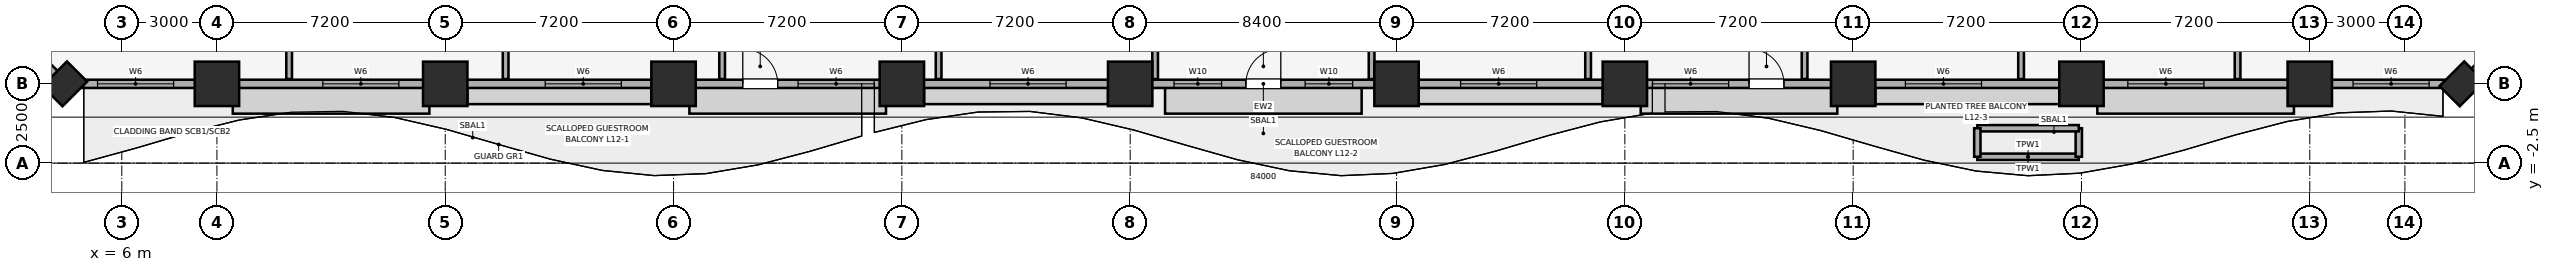
"""IFC4 building model, lengths in metres.
Left out: names, types, materials, properties, quantities, classifications, styles, units other than length and angle.
Written with IfcOpenShell. Run it as: python <this file> out.ifc"""

import sys

from ifc_helpers import new_model, si_unit, direction, frame, frame_2d, origin, origin_2d, place, context, subcontext, project, spatial, rectangle, extrude, element, fill, save


model = new_model("IFC4")
c1 = context("Model", 3, precision=1e-05, world=origin(), true_north=direction((0.0, 1.0)))
c2 = subcontext(c1, "Body", "Model", "MODEL_VIEW")
j1 = project(units=[si_unit("LENGTHUNIT", "METRE"), si_unit("PLANEANGLEUNIT", "RADIAN")], contexts=[c1])
p1 = place(None, origin())
s1 = spatial("IfcSite", under=j1, at=p1, CompositionType="ELEMENT")
p2 = place(p1, origin())
s2 = spatial("IfcBuilding", under=s1, at=p2, CompositionType="ELEMENT")
p3 = place(p2, frame((0.0, 0.0, 57.65)))
s3 = spatial("IfcBuildingStorey", under=s2, at=p3, CompositionType="ELEMENT", Elevation=57.65)
for number, where, z_axis, x_axis in (
    (1, (9.0, 0.0, 0.0), (0.0, 0.0, 1.0), (1.0, 0.0, 0.0)),
    (2, (16.2, 0.0, 0.0), (0.0, 0.0, 1.0), (1.0, 0.0, 0.0)),
    (3, (23.4, 0.0, 0.0), (0.0, 0.0, 1.0), (1.0, 0.0, 0.0)),
    (4, (30.6, 0.0, 0.0), (0.0, 0.0, 1.0), (1.0, 0.0, 0.0)),
    (5, (37.8, 0.0, 0.0), (0.0, 0.0, 1.0), (1.0, 0.0, 0.0)),
    (6, (46.2, 0.0, 0.0), (0.0, 0.0, 1.0), (1.0, 0.0, 0.0)),
    (7, (53.4, 0.0, 0.0), (0.0, 0.0, 1.0), (1.0, 0.0, 0.0)),
    (8, (60.6, 0.0, 0.0), (0.0, 0.0, 1.0), (1.0, 0.0, 0.0)),
    (9, (67.8, 0.0, 0.0), (0.0, 0.0, 1.0), (1.0, 0.0, 0.0)),
    (10, (75.0, 0.0, 0.0), (0.0, 0.0, 1.0), (1.0, 0.0, 0.0)),
):
    element("IfcColumn", number, at=place(p3, frame(where, z_axis=z_axis, x_axis=x_axis)), inside=s3, PredefinedType="COLUMN", context=c2, shape_type="SweptSolid", body=[
        extrude(rectangle(XDim=1.4, YDim=1.4, at=origin_2d()), origin(), (0.0, 0.0, 1.0), 3.51),
    ])
for number, where, z_axis, x_axis in (
    (11, (4.2, 0.0, 0.0), (0.0, 0.0, 1.0), (0.707, 0.707, 0.0)),
    (12, (79.8, 0.0, 0.0), (0.0, 0.0, 1.0), (0.707, 0.707, 0.0)),
):
    element("IfcColumn", number, at=place(p3, frame(where, z_axis=z_axis, x_axis=x_axis)), inside=s3, PredefinedType="PILASTER", context=c2, shape_type="SweptSolid", body=[
        extrude(rectangle(XDim=1.1, YDim=0.9, at=origin_2d()), origin(), (0.0, 0.0, 1.0), 3.51),
    ])
p4 = place(p3, frame((4.2, 0.0, 0.0), z_axis=(0.0, 0.0, 1.0), x_axis=(1.0, 0.0, 0.0)))
e13 = element("IfcWall", 13, at=p4, inside=s3, PredefinedType="SOLIDWALL", context=c2, shape_type="SweptSolid", body=[
    extrude(rectangle(XDim=75.6, YDim=0.26, at=frame_2d((37.8, 0.0))), origin(), (0.0, 0.0, 1.0), 2.56),
])
p5 = place(p4, frame((21.383, 0.0, 0.0)))
e14 = element("IfcOpeningElement", 14, at=p5, cuts=e13, PredefinedType="OPENING", context=c2, shape_type="SweptSolid", body=[
    extrude(rectangle(XDim=1.1, YDim=2.15, at=frame_2d((0.55, 1.075))), frame((0.0, 0.14, 0.0), z_axis=(0.0, -1.0, 0.0), x_axis=(1.0, 0.0, 0.0)), (0.0, 0.0, 1.0), 0.28),
])
p6 = place(p4, frame((37.25, 0.0, 0.0)))
e15 = element("IfcOpeningElement", 15, at=p6, cuts=e13, PredefinedType="OPENING", context=c2, shape_type="SweptSolid", body=[
    extrude(rectangle(XDim=1.1, YDim=2.15, at=frame_2d((0.55, 1.075))), frame((0.0, 0.14, 0.0), z_axis=(0.0, -1.0, 0.0), x_axis=(1.0, 0.0, 0.0)), (0.0, 0.0, 1.0), 0.28),
])
p7 = place(p4, frame((53.117, 0.0, 0.0)))
e16 = element("IfcOpeningElement", 16, at=p7, cuts=e13, PredefinedType="OPENING", context=c2, shape_type="SweptSolid", body=[
    extrude(rectangle(XDim=1.1, YDim=2.15, at=frame_2d((0.55, 1.075))), frame((0.0, 0.14, 0.0), z_axis=(0.0, -1.0, 0.0), x_axis=(1.0, 0.0, 0.0)), (0.0, 0.0, 1.0), 0.28),
])
p8 = place(p4, frame((1.035, 0.0, 0.85)))
e17 = element("IfcOpeningElement", 17, at=p8, cuts=e13, PredefinedType="OPENING", context=c2, shape_type="SweptSolid", body=[
    extrude(rectangle(XDim=2.4, YDim=1.5, at=frame_2d((1.2, 0.75))), frame((0.0, 0.14, 0.0), z_axis=(0.0, -1.0, 0.0), x_axis=(1.0, 0.0, 0.0)), (0.0, 0.0, 1.0), 0.28),
])
p9 = place(p4, frame((8.138, 0.0, 0.85)))
e18 = element("IfcOpeningElement", 18, at=p9, cuts=e13, PredefinedType="OPENING", context=c2, shape_type="SweptSolid", body=[
    extrude(rectangle(XDim=2.4, YDim=1.5, at=frame_2d((1.2, 0.75))), frame((0.0, 0.14, 0.0), z_axis=(0.0, -1.0, 0.0), x_axis=(1.0, 0.0, 0.0)), (0.0, 0.0, 1.0), 0.28),
])
p10 = place(p4, frame((15.153, 0.0, 0.85)))
e19 = element("IfcOpeningElement", 19, at=p10, cuts=e13, PredefinedType="OPENING", context=c2, shape_type="SweptSolid", body=[
    extrude(rectangle(XDim=2.4, YDim=1.5, at=frame_2d((1.2, 0.75))), frame((0.0, 0.14, 0.0), z_axis=(0.0, -1.0, 0.0), x_axis=(1.0, 0.0, 0.0)), (0.0, 0.0, 1.0), 0.28),
])
p11 = place(p4, frame((23.127, 0.0, 0.85)))
e20 = element("IfcOpeningElement", 20, at=p11, cuts=e13, PredefinedType="OPENING", context=c2, shape_type="SweptSolid", body=[
    extrude(rectangle(XDim=2.4, YDim=1.5, at=frame_2d((1.2, 0.75))), frame((0.0, 0.14, 0.0), z_axis=(0.0, -1.0, 0.0), x_axis=(1.0, 0.0, 0.0)), (0.0, 0.0, 1.0), 0.28),
])
p12 = place(p4, frame((29.179, 0.0, 0.85)))
e21 = element("IfcOpeningElement", 21, at=p12, cuts=e13, PredefinedType="OPENING", context=c2, shape_type="SweptSolid", body=[
    extrude(rectangle(XDim=2.4, YDim=1.5, at=frame_2d((1.2, 0.75))), frame((0.0, 0.14, 0.0), z_axis=(0.0, -1.0, 0.0), x_axis=(1.0, 0.0, 0.0)), (0.0, 0.0, 1.0), 0.28),
])
p13 = place(p4, frame((34.983, 0.0, 0.85)))
e22 = element("IfcOpeningElement", 22, at=p13, cuts=e13, PredefinedType="OPENING", context=c2, shape_type="SweptSolid", body=[
    extrude(rectangle(XDim=1.5, YDim=1.4, at=frame_2d((0.75, 0.7))), frame((0.0, 0.14, 0.0), z_axis=(0.0, -1.0, 0.0), x_axis=(1.0, 0.0, 0.0)), (0.0, 0.0, 1.0), 0.28),
])
p14 = place(p4, frame((39.117, 0.0, 0.85)))
e23 = element("IfcOpeningElement", 23, at=p14, cuts=e13, PredefinedType="OPENING", context=c2, shape_type="SweptSolid", body=[
    extrude(rectangle(XDim=1.5, YDim=1.4, at=frame_2d((0.75, 0.7))), frame((0.0, 0.14, 0.0), z_axis=(0.0, -1.0, 0.0), x_axis=(1.0, 0.0, 0.0)), (0.0, 0.0, 1.0), 0.28),
])
p15 = place(p4, frame((44.021, 0.0, 0.85)))
e24 = element("IfcOpeningElement", 24, at=p15, cuts=e13, PredefinedType="OPENING", context=c2, shape_type="SweptSolid", body=[
    extrude(rectangle(XDim=2.4, YDim=1.5, at=frame_2d((1.2, 0.75))), frame((0.0, 0.14, 0.0), z_axis=(0.0, -1.0, 0.0), x_axis=(1.0, 0.0, 0.0)), (0.0, 0.0, 1.0), 0.28),
])
p16 = place(p4, frame((50.073, 0.0, 0.85)))
e25 = element("IfcOpeningElement", 25, at=p16, cuts=e13, PredefinedType="OPENING", context=c2, shape_type="SweptSolid", body=[
    extrude(rectangle(XDim=2.4, YDim=1.5, at=frame_2d((1.2, 0.75))), frame((0.0, 0.14, 0.0), z_axis=(0.0, -1.0, 0.0), x_axis=(1.0, 0.0, 0.0)), (0.0, 0.0, 1.0), 0.28),
])
p17 = place(p4, frame((58.048, 0.0, 0.85)))
e26 = element("IfcOpeningElement", 26, at=p17, cuts=e13, PredefinedType="OPENING", context=c2, shape_type="SweptSolid", body=[
    extrude(rectangle(XDim=2.4, YDim=1.5, at=frame_2d((1.2, 0.75))), frame((0.0, 0.14, 0.0), z_axis=(0.0, -1.0, 0.0), x_axis=(1.0, 0.0, 0.0)), (0.0, 0.0, 1.0), 0.28),
])
p18 = place(p4, frame((65.062, 0.0, 0.85)))
e27 = element("IfcOpeningElement", 27, at=p18, cuts=e13, PredefinedType="OPENING", context=c2, shape_type="SweptSolid", body=[
    extrude(rectangle(XDim=2.4, YDim=1.5, at=frame_2d((1.2, 0.75))), frame((0.0, 0.14, 0.0), z_axis=(0.0, -1.0, 0.0), x_axis=(1.0, 0.0, 0.0)), (0.0, 0.0, 1.0), 0.28),
])
p19 = place(p4, frame((72.165, 0.0, 0.85)))
e28 = element("IfcOpeningElement", 28, at=p19, cuts=e13, PredefinedType="OPENING", context=c2, shape_type="SweptSolid", body=[
    extrude(rectangle(XDim=2.4, YDim=1.5, at=frame_2d((1.2, 0.75))), frame((0.0, 0.14, 0.0), z_axis=(0.0, -1.0, 0.0), x_axis=(1.0, 0.0, 0.0)), (0.0, 0.0, 1.0), 0.28),
])
for number, where, z_axis, x_axis in (
    (29, (79.8, 0.0, 0.0), (0.0, 0.0, 1.0), (0.707, 0.707, 0.0)),
    (30, (0.0, 4.2, 0.0), (0.0, 0.0, 1.0), (0.707, -0.707, 0.0)),
):
    element("IfcWall", number, at=place(p3, frame(where, z_axis=z_axis, x_axis=x_axis)), inside=s3, PredefinedType="SOLIDWALL", context=c2, shape_type="SweptSolid", body=[
        extrude(rectangle(XDim=5.94, YDim=0.26, at=frame_2d((2.97, 0.0))), origin(), (0.0, 0.0, 1.0), 2.56),
    ])
p20 = place(p3, frame((64.516, -2.3, 0.0), z_axis=(0.0, 0.0, 1.0), x_axis=(1.0, 0.0, 0.0)))
e31 = element("IfcWall", 31, at=p20, inside=s3, PredefinedType="PARAPET", context=c2, shape_type="SweptSolid", body=[
    extrude(rectangle(XDim=3.2, YDim=0.2, at=frame_2d((1.6, 0.0))), origin(), (0.0, 0.0, 1.0), 0.55),
])
p21 = place(p3, frame((67.716, -2.3, 0.0), z_axis=(0.0, 0.0, 1.0), x_axis=(0.0, 1.0, 0.0)))
e32 = element("IfcWall", 32, at=p21, inside=s3, PredefinedType="PARAPET", context=c2, shape_type="SweptSolid", body=[
    extrude(rectangle(XDim=0.9, YDim=0.2, at=frame_2d((0.45, 0.0))), origin(), (0.0, 0.0, 1.0), 0.55),
])
p22 = place(p3, frame((67.716, -1.4, 0.0), z_axis=(0.0, 0.0, 1.0), x_axis=(-1.0, 0.0, 0.0)))
e33 = element("IfcWall", 33, at=p22, inside=s3, PredefinedType="PARAPET", context=c2, shape_type="SweptSolid", body=[
    extrude(rectangle(XDim=3.2, YDim=0.2, at=frame_2d((1.6, 0.0))), origin(), (0.0, 0.0, 1.0), 0.55),
])
p23 = place(p3, frame((64.516, -1.4, 0.0), z_axis=(0.0, 0.0, 1.0), x_axis=(0.0, -1.0, 0.0)))
e34 = element("IfcWall", 34, at=p23, inside=s3, PredefinedType="PARAPET", context=c2, shape_type="SweptSolid", body=[
    extrude(rectangle(XDim=0.9, YDim=0.2, at=frame_2d((0.45, 0.0))), origin(), (0.0, 0.0, 1.0), 0.55),
])
for number, where, z_axis, x_axis in (
    (35, (11.277, 0.15, 0.0), (0.0, 0.0, 1.0), (0.0, 1.0, 0.0)),
    (36, (18.104, 0.15, 0.0), (0.0, 0.0, 1.0), (0.0, 1.0, 0.0)),
    (37, (24.932, 0.15, 0.0), (0.0, 0.0, 1.0), (0.0, 1.0, 0.0)),
    (38, (31.759, 0.15, 0.0), (0.0, 0.0, 1.0), (0.0, 1.0, 0.0)),
    (39, (38.586, 0.15, 0.0), (0.0, 0.0, 1.0), (0.0, 1.0, 0.0)),
    (40, (45.414, 0.15, 0.0), (0.0, 0.0, 1.0), (0.0, 1.0, 0.0)),
    (41, (52.241, 0.15, 0.0), (0.0, 0.0, 1.0), (0.0, 1.0, 0.0)),
    (42, (59.068, 0.15, 0.0), (0.0, 0.0, 1.0), (0.0, 1.0, 0.0)),
    (43, (65.896, 0.15, 0.0), (0.0, 0.0, 1.0), (0.0, 1.0, 0.0)),
    (44, (72.723, 0.15, 0.0), (0.0, 0.0, 1.0), (0.0, 1.0, 0.0)),
):
    element("IfcWall", number, at=place(p3, frame(where, z_axis=z_axis, x_axis=x_axis)), inside=s3, PredefinedType="PARTITIONING", context=c2, shape_type="SweptSolid", body=[
        extrude(rectangle(XDim=11.355, YDim=0.18, at=frame_2d((5.677, 0.0))), origin(), (0.0, 0.0, 1.0), 3.51),
    ])
p24 = place(p5, origin())
e45 = element("IfcDoor", 45, at=p24, inside=s3, OperationType="SINGLE_SWING_LEFT", PredefinedType="DOOR", context=c2, shape_type="SweptSolid", body=[
    extrude(rectangle(XDim=1.1, YDim=2.15, at=frame_2d((0.55, 1.075))), frame((0.0, 0.025, 0.0), z_axis=(0.0, -1.0, 0.0), x_axis=(1.0, 0.0, 0.0)), (0.0, 0.0, 1.0), 0.05),
])
fill(e14, e45)
p25 = place(p6, origin())
e46 = element("IfcDoor", 46, at=p25, inside=s3, OperationType="SINGLE_SWING_RIGHT", PredefinedType="DOOR", context=c2, shape_type="SweptSolid", body=[
    extrude(rectangle(XDim=1.1, YDim=2.15, at=frame_2d((0.55, 1.075))), frame((0.0, 0.025, 0.0), z_axis=(0.0, -1.0, 0.0), x_axis=(1.0, 0.0, 0.0)), (0.0, 0.0, 1.0), 0.05),
])
fill(e15, e46)
p26 = place(p7, origin())
e47 = element("IfcDoor", 47, at=p26, inside=s3, OperationType="SINGLE_SWING_LEFT", PredefinedType="DOOR", context=c2, shape_type="SweptSolid", body=[
    extrude(rectangle(XDim=1.1, YDim=2.15, at=frame_2d((0.55, 1.075))), frame((0.0, 0.025, 0.0), z_axis=(0.0, -1.0, 0.0), x_axis=(1.0, 0.0, 0.0)), (0.0, 0.0, 1.0), 0.05),
])
fill(e16, e47)
p27 = place(p8, origin())
e48 = element("IfcWindow", 48, at=p27, inside=s3, PartitioningType="SINGLE_PANEL", PredefinedType="WINDOW", context=c2, shape_type="SweptSolid", body=[
    extrude(rectangle(XDim=2.4, YDim=1.5, at=frame_2d((1.2, 0.75))), frame((0.0, 0.03, 0.0), z_axis=(0.0, -1.0, 0.0), x_axis=(1.0, 0.0, 0.0)), (0.0, 0.0, 1.0), 0.06),
])
fill(e17, e48)
p28 = place(p9, origin())
e49 = element("IfcWindow", 49, at=p28, inside=s3, PartitioningType="SINGLE_PANEL", PredefinedType="WINDOW", context=c2, shape_type="SweptSolid", body=[
    extrude(rectangle(XDim=2.4, YDim=1.5, at=frame_2d((1.2, 0.75))), frame((0.0, 0.03, 0.0), z_axis=(0.0, -1.0, 0.0), x_axis=(1.0, 0.0, 0.0)), (0.0, 0.0, 1.0), 0.06),
])
fill(e18, e49)
p29 = place(p10, origin())
e50 = element("IfcWindow", 50, at=p29, inside=s3, PartitioningType="SINGLE_PANEL", PredefinedType="WINDOW", context=c2, shape_type="SweptSolid", body=[
    extrude(rectangle(XDim=2.4, YDim=1.5, at=frame_2d((1.2, 0.75))), frame((0.0, 0.03, 0.0), z_axis=(0.0, -1.0, 0.0), x_axis=(1.0, 0.0, 0.0)), (0.0, 0.0, 1.0), 0.06),
])
fill(e19, e50)
p30 = place(p11, origin())
e51 = element("IfcWindow", 51, at=p30, inside=s3, PartitioningType="SINGLE_PANEL", PredefinedType="WINDOW", context=c2, shape_type="SweptSolid", body=[
    extrude(rectangle(XDim=2.4, YDim=1.5, at=frame_2d((1.2, 0.75))), frame((0.0, 0.03, 0.0), z_axis=(0.0, -1.0, 0.0), x_axis=(1.0, 0.0, 0.0)), (0.0, 0.0, 1.0), 0.06),
])
fill(e20, e51)
p31 = place(p12, origin())
e52 = element("IfcWindow", 52, at=p31, inside=s3, PartitioningType="SINGLE_PANEL", PredefinedType="WINDOW", context=c2, shape_type="SweptSolid", body=[
    extrude(rectangle(XDim=2.4, YDim=1.5, at=frame_2d((1.2, 0.75))), frame((0.0, 0.03, 0.0), z_axis=(0.0, -1.0, 0.0), x_axis=(1.0, 0.0, 0.0)), (0.0, 0.0, 1.0), 0.06),
])
fill(e21, e52)
p32 = place(p13, origin())
e53 = element("IfcWindow", 53, at=p32, inside=s3, PartitioningType="SINGLE_PANEL", PredefinedType="WINDOW", context=c2, shape_type="SweptSolid", body=[
    extrude(rectangle(XDim=1.5, YDim=1.4, at=frame_2d((0.75, 0.7))), frame((0.0, 0.03, 0.0), z_axis=(0.0, -1.0, 0.0), x_axis=(1.0, 0.0, 0.0)), (0.0, 0.0, 1.0), 0.06),
])
fill(e22, e53)
p33 = place(p14, origin())
e54 = element("IfcWindow", 54, at=p33, inside=s3, PartitioningType="SINGLE_PANEL", PredefinedType="WINDOW", context=c2, shape_type="SweptSolid", body=[
    extrude(rectangle(XDim=1.5, YDim=1.4, at=frame_2d((0.75, 0.7))), frame((0.0, 0.03, 0.0), z_axis=(0.0, -1.0, 0.0), x_axis=(1.0, 0.0, 0.0)), (0.0, 0.0, 1.0), 0.06),
])
fill(e23, e54)
p34 = place(p15, origin())
e55 = element("IfcWindow", 55, at=p34, inside=s3, PartitioningType="SINGLE_PANEL", PredefinedType="WINDOW", context=c2, shape_type="SweptSolid", body=[
    extrude(rectangle(XDim=2.4, YDim=1.5, at=frame_2d((1.2, 0.75))), frame((0.0, 0.03, 0.0), z_axis=(0.0, -1.0, 0.0), x_axis=(1.0, 0.0, 0.0)), (0.0, 0.0, 1.0), 0.06),
])
fill(e24, e55)
p35 = place(p16, origin())
e56 = element("IfcWindow", 56, at=p35, inside=s3, PartitioningType="SINGLE_PANEL", PredefinedType="WINDOW", context=c2, shape_type="SweptSolid", body=[
    extrude(rectangle(XDim=2.4, YDim=1.5, at=frame_2d((1.2, 0.75))), frame((0.0, 0.03, 0.0), z_axis=(0.0, -1.0, 0.0), x_axis=(1.0, 0.0, 0.0)), (0.0, 0.0, 1.0), 0.06),
])
fill(e25, e56)
p36 = place(p17, origin())
e57 = element("IfcWindow", 57, at=p36, inside=s3, PartitioningType="SINGLE_PANEL", PredefinedType="WINDOW", context=c2, shape_type="SweptSolid", body=[
    extrude(rectangle(XDim=2.4, YDim=1.5, at=frame_2d((1.2, 0.75))), frame((0.0, 0.03, 0.0), z_axis=(0.0, -1.0, 0.0), x_axis=(1.0, 0.0, 0.0)), (0.0, 0.0, 1.0), 0.06),
])
fill(e26, e57)
p37 = place(p18, origin())
e58 = element("IfcWindow", 58, at=p37, inside=s3, PartitioningType="SINGLE_PANEL", PredefinedType="WINDOW", context=c2, shape_type="SweptSolid", body=[
    extrude(rectangle(XDim=2.4, YDim=1.5, at=frame_2d((1.2, 0.75))), frame((0.0, 0.03, 0.0), z_axis=(0.0, -1.0, 0.0), x_axis=(1.0, 0.0, 0.0)), (0.0, 0.0, 1.0), 0.06),
])
fill(e27, e58)
p38 = place(p19, origin())
e59 = element("IfcWindow", 59, at=p38, inside=s3, PartitioningType="SINGLE_PANEL", PredefinedType="WINDOW", context=c2, shape_type="SweptSolid", body=[
    extrude(rectangle(XDim=2.4, YDim=1.5, at=frame_2d((1.2, 0.75))), frame((0.0, 0.03, 0.0), z_axis=(0.0, -1.0, 0.0), x_axis=(1.0, 0.0, 0.0)), (0.0, 0.0, 1.0), 0.06),
])
fill(e28, e59)
save(model, sys.argv[1])
